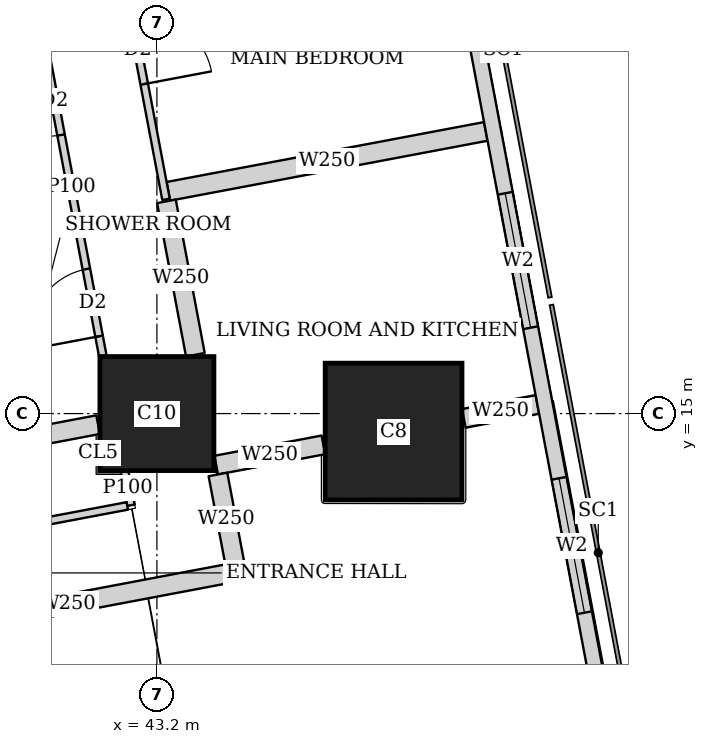
"""IFC4 building model, lengths in metres.
Left out: names, types, materials, properties, quantities, classifications, styles, units other than length and angle.
Written with IfcOpenShell. Run it as: python <this file> out.ifc"""

import sys

from ifc_helpers import new_model, si_unit, direction, frame, frame_2d, origin, origin_2d, place, context, subcontext, project, spatial, rectangle, extrude, element, fill, save


model = new_model("IFC4")
c1 = context("Model", 3, precision=1e-05, world=origin(), true_north=direction((0.0, 1.0)))
c2 = subcontext(c1, "Body", "Model", "MODEL_VIEW")
j1 = project(units=[si_unit("LENGTHUNIT", "METRE"), si_unit("PLANEANGLEUNIT", "RADIAN")], contexts=[c1])
p1 = place(None, origin())
s1 = spatial("IfcSite", under=j1, at=p1, CompositionType="ELEMENT")
p2 = place(p1, origin())
s2 = spatial("IfcBuilding", under=s1, at=p2, CompositionType="ELEMENT")
p3 = place(p2, frame((0.0, 0.0, 169.55)))
s3 = spatial("IfcBuildingStorey", under=s2, at=p3, CompositionType="ELEMENT", Elevation=169.55)
p4 = place(p3, frame((43.2, 15.0, 0.0), z_axis=(0.0, 0.0, 1.0), x_axis=(1.0, 0.0, 0.0)))
e1 = element("IfcColumn", 1, at=p4, inside=s3, PredefinedType="COLUMN", context=c2, shape_type="SweptSolid", body=[
    extrude(rectangle(XDim=1.5, YDim=1.5, at=origin_2d()), origin(), (0.0, 0.0, 1.0), 3.75),
])
p5 = place(p3, frame((46.314, 14.763, 0.0), z_axis=(0.0, 0.0, 1.0), x_axis=(1.0, 0.0, 0.0)))
e2 = element("IfcColumn", 2, at=p5, inside=s3, PredefinedType="COLUMN", context=c2, shape_type="SweptSolid", body=[
    extrude(rectangle(XDim=1.8, YDim=1.8, at=origin_2d()), origin(), (0.0, 0.0, 1.0), 3.75),
])
p6 = place(p3, frame((50.653, 2.703, 0.0), z_axis=(0.0, 0.0, 1.0), x_axis=(-0.185612026696, 0.982623109613, 0.0)))
e3 = element("IfcWall", 3, at=p6, inside=s3, PredefinedType="SOLIDWALL", context=c2, shape_type="SweptSolid", body=[
    extrude(rectangle(XDim=41.393, YDim=0.2, at=frame_2d((20.697, 0.0))), origin(), (0.0, 0.0, 1.0), 3.5),
])
p7 = place(p6, frame((1.633, 0.0, 0.9)))
e4 = element("IfcOpeningElement", 4, at=p7, cuts=e3, PredefinedType="OPENING", context=c2, shape_type="SweptSolid", body=[
    extrude(rectangle(XDim=1.8, YDim=1.5, at=frame_2d((0.9, 0.75))), frame((0.0, 0.11, 0.0), z_axis=(0.0, -1.0, 0.0), x_axis=(1.0, 0.0, 0.0)), (0.0, 0.0, 1.0), 0.22),
])
p8 = place(p6, frame((6.032, 0.0, 0.9)))
e5 = element("IfcOpeningElement", 5, at=p8, cuts=e3, PredefinedType="OPENING", context=c2, shape_type="SweptSolid", body=[
    extrude(rectangle(XDim=1.8, YDim=1.5, at=frame_2d((0.9, 0.75))), frame((0.0, 0.11, 0.0), z_axis=(0.0, -1.0, 0.0), x_axis=(1.0, 0.0, 0.0)), (0.0, 0.0, 1.0), 0.22),
])
p9 = place(p6, frame((9.848, 0.0, 0.9)))
e6 = element("IfcOpeningElement", 6, at=p9, cuts=e3, PredefinedType="OPENING", context=c2, shape_type="SweptSolid", body=[
    extrude(rectangle(XDim=1.8, YDim=1.5, at=frame_2d((0.9, 0.75))), frame((0.0, 0.11, 0.0), z_axis=(0.0, -1.0, 0.0), x_axis=(1.0, 0.0, 0.0)), (0.0, 0.0, 1.0), 0.22),
])
p10 = place(p6, frame((13.664, 0.0, 0.9)))
e7 = element("IfcOpeningElement", 7, at=p10, cuts=e3, PredefinedType="OPENING", context=c2, shape_type="SweptSolid", body=[
    extrude(rectangle(XDim=1.8, YDim=1.5, at=frame_2d((0.9, 0.75))), frame((0.0, 0.11, 0.0), z_axis=(0.0, -1.0, 0.0), x_axis=(1.0, 0.0, 0.0)), (0.0, 0.0, 1.0), 0.22),
])
p11 = place(p6, frame((17.481, 0.0, 0.9)))
e8 = element("IfcOpeningElement", 8, at=p11, cuts=e3, PredefinedType="OPENING", context=c2, shape_type="SweptSolid", body=[
    extrude(rectangle(XDim=1.8, YDim=1.5, at=frame_2d((0.9, 0.75))), frame((0.0, 0.11, 0.0), z_axis=(0.0, -1.0, 0.0), x_axis=(1.0, 0.0, 0.0)), (0.0, 0.0, 1.0), 0.22),
])
p12 = place(p6, frame((21.297, 0.0, 0.9)))
e9 = element("IfcOpeningElement", 9, at=p12, cuts=e3, PredefinedType="OPENING", context=c2, shape_type="SweptSolid", body=[
    extrude(rectangle(XDim=1.8, YDim=1.5, at=frame_2d((0.9, 0.75))), frame((0.0, 0.11, 0.0), z_axis=(0.0, -1.0, 0.0), x_axis=(1.0, 0.0, 0.0)), (0.0, 0.0, 1.0), 0.22),
])
p13 = place(p6, frame((25.113, 0.0, 0.9)))
e10 = element("IfcOpeningElement", 10, at=p13, cuts=e3, PredefinedType="OPENING", context=c2, shape_type="SweptSolid", body=[
    extrude(rectangle(XDim=1.8, YDim=1.5, at=frame_2d((0.9, 0.75))), frame((0.0, 0.11, 0.0), z_axis=(0.0, -1.0, 0.0), x_axis=(1.0, 0.0, 0.0)), (0.0, 0.0, 1.0), 0.22),
])
p14 = place(p6, frame((28.93, 0.0, 0.9)))
e11 = element("IfcOpeningElement", 11, at=p14, cuts=e3, PredefinedType="OPENING", context=c2, shape_type="SweptSolid", body=[
    extrude(rectangle(XDim=1.8, YDim=1.5, at=frame_2d((0.9, 0.75))), frame((0.0, 0.11, 0.0), z_axis=(0.0, -1.0, 0.0), x_axis=(1.0, 0.0, 0.0)), (0.0, 0.0, 1.0), 0.22),
])
p15 = place(p6, frame((32.746, 0.0, 0.9)))
e12 = element("IfcOpeningElement", 12, at=p15, cuts=e3, PredefinedType="OPENING", context=c2, shape_type="SweptSolid", body=[
    extrude(rectangle(XDim=1.8, YDim=1.5, at=frame_2d((0.9, 0.75))), frame((0.0, 0.11, 0.0), z_axis=(0.0, -1.0, 0.0), x_axis=(1.0, 0.0, 0.0)), (0.0, 0.0, 1.0), 0.22),
])
p16 = place(p6, frame((36.481, 0.0, 0.9)))
e13 = element("IfcOpeningElement", 13, at=p16, cuts=e3, PredefinedType="OPENING", context=c2, shape_type="SweptSolid", body=[
    extrude(rectangle(XDim=1.8, YDim=1.5, at=frame_2d((0.9, 0.75))), frame((0.0, 0.11, 0.0), z_axis=(0.0, -1.0, 0.0), x_axis=(1.0, 0.0, 0.0)), (0.0, 0.0, 1.0), 0.22),
])
p17 = place(p3, frame((42.565, 21.809, 0.0), z_axis=(0.0, 0.0, 1.0), x_axis=(0.185910488551, -0.982566684885, 0.0)))
e14 = element("IfcWall", 14, at=p17, inside=s3, PredefinedType="PARTITIONING", context=c2, shape_type="SweptSolid", body=[
    extrude(rectangle(XDim=4.062, YDim=0.1, at=frame_2d((2.031, 0.0))), origin(), (0.0, 0.0, 1.0), 2.5),
])
p18 = place(p17, frame((1.618, 0.0, 0.0)))
e15 = element("IfcOpeningElement", 15, at=p18, cuts=e14, PredefinedType="OPENING", context=c2, shape_type="SweptSolid", body=[
    extrude(rectangle(XDim=0.9, YDim=2.1, at=frame_2d((0.45, 1.05))), frame((0.0, 0.06, 0.0), z_axis=(0.0, -1.0, 0.0), x_axis=(1.0, 0.0, 0.0)), (0.0, 0.0, 1.0), 0.12),
])
p19 = place(p3, frame((41.65, 20.193, 0.0), z_axis=(0.0, 0.0, 1.0), x_axis=(0.185692658583, -0.982607875273, 0.0)))
e16 = element("IfcWall", 16, at=p19, inside=s3, PredefinedType="PARTITIONING", context=c2, shape_type="SweptSolid", body=[
    extrude(rectangle(XDim=4.514, YDim=0.1, at=frame_2d((2.257, 0.0))), origin(), (0.0, 0.0, 1.0), 3.5),
])
p20 = place(p19, frame((0.655, 0.0, 0.0)))
e17 = element("IfcOpeningElement", 17, at=p20, cuts=e16, PredefinedType="OPENING", context=c2, shape_type="SweptSolid", body=[
    extrude(rectangle(XDim=0.9, YDim=2.1, at=frame_2d((0.45, 1.05))), frame((0.0, 0.06, 0.0), z_axis=(0.0, -1.0, 0.0), x_axis=(1.0, 0.0, 0.0)), (0.0, 0.0, 1.0), 0.12),
])
p21 = place(p19, frame((3.35, 0.0, 0.0)))
e18 = element("IfcOpeningElement", 18, at=p21, cuts=e16, PredefinedType="OPENING", context=c2, shape_type="SweptSolid", body=[
    extrude(rectangle(XDim=0.9, YDim=2.1, at=frame_2d((0.45, 1.05))), frame((0.0, 0.06, 0.0), z_axis=(0.0, -1.0, 0.0), x_axis=(1.0, 0.0, 0.0)), (0.0, 0.0, 1.0), 0.12),
])
p22 = place(p3, frame((42.011, 18.012, 0.0), z_axis=(0.0, 0.0, 1.0), x_axis=(-0.982674977865, -0.185337227447, 0.0)))
e19 = element("IfcWall", 19, at=p22, inside=s3, PredefinedType="PARTITIONING", context=c2, shape_type="SweptSolid", body=[
    extrude(rectangle(XDim=3.275, YDim=0.1, at=frame_2d((1.637, 0.0))), origin(), (0.0, 0.0, 1.0), 3.5),
])
p23 = place(p3, frame((42.775, 14.24, 0.0), z_axis=(0.0, 0.0, 1.0), x_axis=(0.185035443692, -0.982731847748, 0.0)))
e20 = element("IfcWall", 20, at=p23, inside=s3, PredefinedType="PARTITIONING", context=c2, shape_type="SweptSolid", body=[
    extrude(rectangle(XDim=0.454, YDim=0.1, at=frame_2d((0.227, 0.0))), origin(), (0.0, 0.0, 1.0), 3.5),
])
p24 = place(p3, frame((42.81, 13.785, 0.0), z_axis=(0.0, 0.0, 1.0), x_axis=(-0.982620626894, -0.185625169636, 0.0)))
e21 = element("IfcWall", 21, at=p24, inside=s3, PredefinedType="PARTITIONING", context=c2, shape_type="SweptSolid", body=[
    extrude(rectangle(XDim=3.275, YDim=0.1, at=frame_2d((1.637, 0.0))), origin(), (0.0, 0.0, 1.0), 3.5),
])
p25 = place(p24, frame((1.201, 0.0, 0.0)))
e22 = element("IfcOpeningElement", 22, at=p25, cuts=e21, PredefinedType="OPENING", context=c2, shape_type="SweptSolid", body=[
    extrude(rectangle(XDim=0.9, YDim=2.1, at=frame_2d((0.45, 1.05))), frame((0.0, 0.06, 0.0), z_axis=(0.0, -1.0, 0.0), x_axis=(1.0, 0.0, 0.0)), (0.0, 0.0, 1.0), 0.12),
])
p26 = place(p3, frame((47.527, 18.712, 0.0), z_axis=(0.0, 0.0, 1.0), x_axis=(-0.982665405803, -0.185387972203, 0.0)))
e23 = element("IfcWall", 23, at=p26, inside=s3, PredefinedType="SOLIDWALL", context=c2, shape_type="SweptSolid", body=[
    extrude(rectangle(XDim=4.25, YDim=0.25, at=frame_2d((2.125, 0.0))), origin(), (0.0, 0.0, 1.0), 2.1),
])
p27 = place(p3, frame((42.426, 14.854, 0.0), z_axis=(0.0, 0.0, 1.0), x_axis=(-0.982603320446, -0.185716759201, 0.0)))
e24 = element("IfcWall", 24, at=p27, inside=s3, PredefinedType="SOLIDWALL", context=c2, shape_type="SweptSolid", body=[
    extrude(rectangle(XDim=3.096, YDim=0.25, at=frame_2d((1.548, 0.0))), origin(), (0.0, 0.0, 1.0), 3.5),
])
p28 = place(p3, frame((43.325, 17.792, 0.0), z_axis=(0.0, 0.0, 1.0), x_axis=(0.185565963553, -0.982631809566, 0.0)))
e25 = element("IfcWall", 25, at=p28, inside=s3, PredefinedType="SOLIDWALL", context=c2, shape_type="SweptSolid", body=[
    extrude(rectangle(XDim=2.054, YDim=0.25, at=frame_2d((1.027, 0.0))), origin(), (0.0, 0.0, 1.0), 3.5),
])
p29 = place(p3, frame((48.206, 15.12, 0.0), z_axis=(0.0, 0.0, 1.0), x_axis=(-0.982576361834, -0.185859337043, 0.0)))
e26 = element("IfcWall", 26, at=p29, inside=s3, PredefinedType="SOLIDWALL", context=c2, shape_type="SweptSolid", body=[
    extrude(rectangle(XDim=0.985, YDim=0.25, at=frame_2d((0.493, 0.0))), origin(), (0.0, 0.0, 1.0), 2.1),
])
p30 = place(p3, frame((45.39, 14.588, 0.0), z_axis=(0.0, 0.0, 1.0), x_axis=(-0.982680951688, -0.18530555089, 0.0)))
e27 = element("IfcWall", 27, at=p30, inside=s3, PredefinedType="SOLIDWALL", context=c2, shape_type="SweptSolid", body=[
    extrude(rectangle(XDim=1.435, YDim=0.25, at=frame_2d((0.717, 0.0))), origin(), (0.0, 0.0, 1.0), 2.1),
])
p31 = place(p3, frame((44.246, 12.916, 0.0), z_axis=(0.0, 0.0, 1.0), x_axis=(-0.982612837616, -0.185666398014, 0.0)))
e28 = element("IfcWall", 28, at=p31, inside=s3, PredefinedType="SOLIDWALL", context=c2, shape_type="SweptSolid", body=[
    extrude(rectangle(XDim=4.525, YDim=0.25, at=frame_2d((2.262, 0.0))), origin(), (0.0, 0.0, 1.0), 3.5),
])
p32 = place(p3, frame((44.003, 14.199, 0.0), z_axis=(0.0, 0.0, 1.0), x_axis=(0.186323326179, -0.982488482437, 0.0)))
e29 = element("IfcWall", 29, at=p32, inside=s3, PredefinedType="SOLIDWALL", context=c2, shape_type="SweptSolid", body=[
    extrude(rectangle(XDim=1.181, YDim=0.25, at=frame_2d((0.59, 0.0))), origin(), (0.0, 0.0, 1.0), 3.5),
])
p33 = place(p9, origin())
e30 = element("IfcWindow", 30, at=p33, inside=s3, PartitioningType="SINGLE_PANEL", PredefinedType="WINDOW", context=c2, shape_type="SweptSolid", body=[
    extrude(rectangle(XDim=1.8, YDim=1.5, at=frame_2d((0.9, 0.75))), frame((0.0, 0.03, 0.0), z_axis=(0.0, -1.0, 0.0), x_axis=(1.0, 0.0, 0.0)), (0.0, 0.0, 1.0), 0.06),
])
fill(e6, e30)
p34 = place(p10, origin())
e31 = element("IfcWindow", 31, at=p34, inside=s3, PartitioningType="SINGLE_PANEL", PredefinedType="WINDOW", context=c2, shape_type="SweptSolid", body=[
    extrude(rectangle(XDim=1.8, YDim=1.5, at=frame_2d((0.9, 0.75))), frame((0.0, 0.03, 0.0), z_axis=(0.0, -1.0, 0.0), x_axis=(1.0, 0.0, 0.0)), (0.0, 0.0, 1.0), 0.06),
])
fill(e7, e31)
p35 = place(p18, origin())
e32 = element("IfcDoor", 32, at=p35, inside=s3, OperationType="SINGLE_SWING_RIGHT", PredefinedType="DOOR", context=c2, shape_type="SweptSolid", body=[
    extrude(rectangle(XDim=0.9, YDim=2.1, at=frame_2d((0.45, 1.05))), frame((0.0, 0.025, 0.0), z_axis=(0.0, -1.0, 0.0), x_axis=(1.0, 0.0, 0.0)), (0.0, 0.0, 1.0), 0.05),
])
fill(e15, e32)
p36 = place(p20, origin())
e33 = element("IfcDoor", 33, at=p36, inside=s3, OperationType="SINGLE_SWING_RIGHT", PredefinedType="DOOR", context=c2, shape_type="SweptSolid", body=[
    extrude(rectangle(XDim=0.9, YDim=2.1, at=frame_2d((0.45, 1.05))), frame((0.0, 0.025, 0.0), z_axis=(0.0, -1.0, 0.0), x_axis=(1.0, 0.0, 0.0)), (0.0, 0.0, 1.0), 0.05),
])
fill(e17, e33)
p37 = place(p21, origin())
e34 = element("IfcDoor", 34, at=p37, inside=s3, OperationType="SINGLE_SWING_LEFT", PredefinedType="DOOR", context=c2, shape_type="SweptSolid", body=[
    extrude(rectangle(XDim=0.9, YDim=2.1, at=frame_2d((0.45, 1.05))), frame((0.0, 0.025, 0.0), z_axis=(0.0, -1.0, 0.0), x_axis=(1.0, 0.0, 0.0)), (0.0, 0.0, 1.0), 0.05),
])
fill(e18, e34)
save(model, sys.argv[1])
